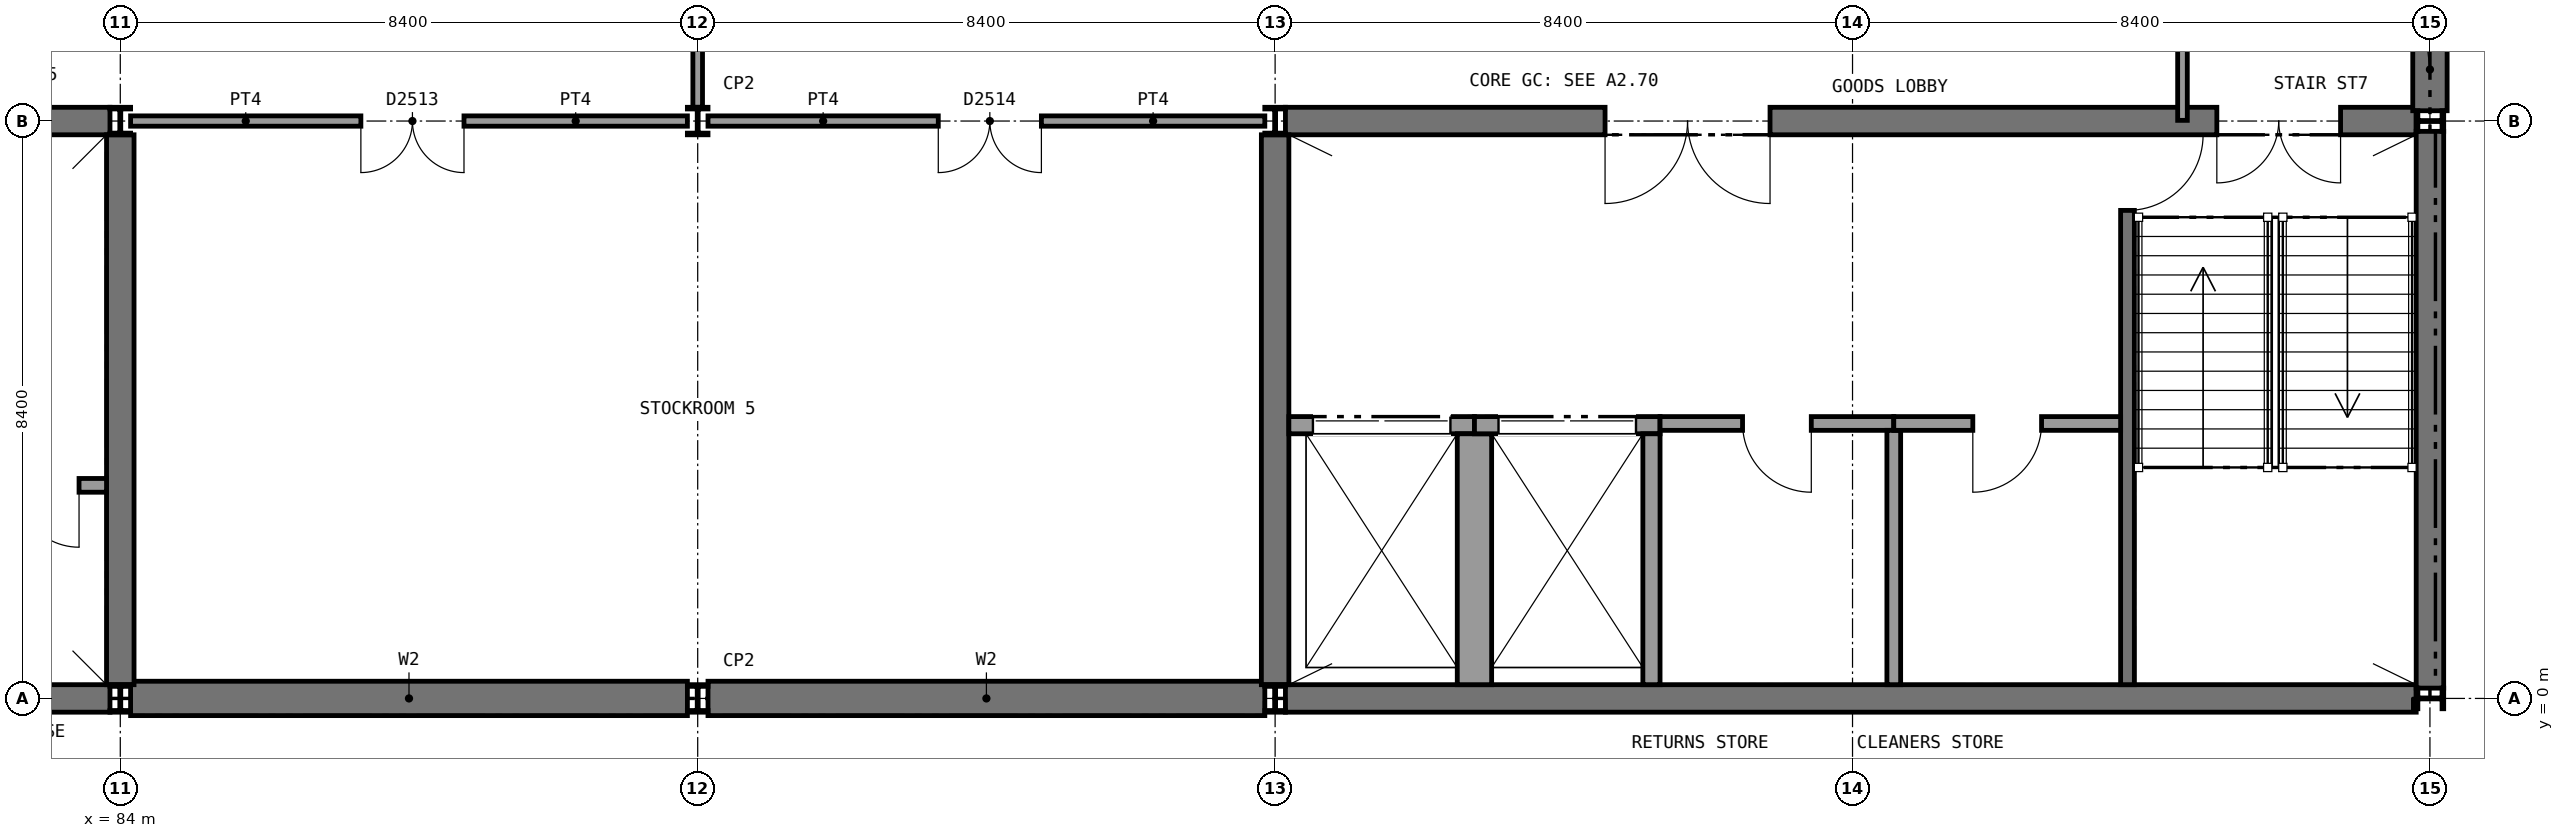
"""IFC4 building model, lengths in metres.
Left out: names, types, materials, properties, quantities, classifications, styles, units other than length and angle.
Written with IfcOpenShell. Run it as: python <this file> out.ifc"""

import sys

from ifc_helpers import new_model, si_unit, direction, frame, frame_2d, origin, origin_2d, place, context, subcontext, project, spatial, rectangle, i_section, extrude, element, fill, save


model = new_model("IFC4")
c1 = context("Model", 3, precision=1e-05, world=origin(), true_north=direction((0.0, 1.0)))
c2 = subcontext(c1, "Body", "Model", "MODEL_VIEW")
j1 = project(units=[si_unit("LENGTHUNIT", "METRE"), si_unit("PLANEANGLEUNIT", "RADIAN")], contexts=[c1])
p1 = place(None, origin())
s1 = spatial("IfcSite", under=j1, at=p1, CompositionType="ELEMENT")
p2 = place(p1, origin())
s2 = spatial("IfcBuilding", under=s1, at=p2, CompositionType="ELEMENT")
p3 = place(p2, frame((0.0, 0.0, 16.2)))
s3 = spatial("IfcBuildingStorey", under=s2, at=p3, CompositionType="ELEMENT", Elevation=16.2)
p4 = place(p3, frame((84.15, 0.0, 0.0), z_axis=(0.0, 0.0, 1.0), x_axis=(1.0, 0.0, 0.0)))
e1 = element("IfcWall", 1, at=p4, inside=s3, PredefinedType="SHEAR", context=c2, shape_type="SweptSolid", body=[
    extrude(rectangle(XDim=8.1, YDim=0.5, at=frame_2d((4.05, 0.0))), origin(), (0.0, 0.0, 1.0), 4.65),
])
p5 = place(p3, frame((92.55, 0.0, 0.0), z_axis=(0.0, 0.0, 1.0), x_axis=(1.0, 0.0, 0.0)))
e2 = element("IfcWall", 2, at=p5, inside=s3, PredefinedType="SHEAR", context=c2, shape_type="SweptSolid", body=[
    extrude(rectangle(XDim=8.1, YDim=0.5, at=frame_2d((4.05, 0.0))), origin(), (0.0, 0.0, 1.0), 4.65),
])
p6 = place(p3, frame((75.75, 0.0, 0.0), z_axis=(0.0, 0.0, 1.0), x_axis=(1.0, 0.0, 0.0)))
e3 = element("IfcWall", 3, at=p6, inside=s3, PredefinedType="SHEAR", context=c2, shape_type="SweptSolid", body=[
    extrude(rectangle(XDim=8.1, YDim=0.4, at=frame_2d((4.05, 0.0))), origin(), (0.0, 0.0, 1.0), 4.65),
])
p7 = place(p3, frame((75.75, 8.4, 0.0), z_axis=(0.0, 0.0, 1.0), x_axis=(1.0, 0.0, 0.0)))
e4 = element("IfcWall", 4, at=p7, inside=s3, PredefinedType="SHEAR", context=c2, shape_type="SweptSolid", body=[
    extrude(rectangle(XDim=8.1, YDim=0.4, at=frame_2d((4.05, 0.0))), origin(), (0.0, 0.0, 1.0), 4.65),
])
p8 = place(p7, frame((1.15, 0.0, 0.0)))
e5 = element("IfcOpeningElement", 5, at=p8, cuts=e4, PredefinedType="OPENING", context=c2, shape_type="SweptSolid", body=[
    extrude(rectangle(XDim=1.8, YDim=2.1, at=frame_2d((0.9, 1.05))), frame((0.0, 0.21, 0.0), z_axis=(0.0, -1.0, 0.0), x_axis=(1.0, 0.0, 0.0)), (0.0, 0.0, 1.0), 0.42),
])
p9 = place(p7, frame((5.3, 0.0, 0.0)))
e6 = element("IfcOpeningElement", 6, at=p9, cuts=e4, PredefinedType="OPENING", context=c2, shape_type="SweptSolid", body=[
    extrude(rectangle(XDim=1.8, YDim=2.1, at=frame_2d((0.9, 1.05))), frame((0.0, 0.21, 0.0), z_axis=(0.0, -1.0, 0.0), x_axis=(1.0, 0.0, 0.0)), (0.0, 0.0, 1.0), 0.42),
])
p10 = place(p3, frame((84.0, 0.2, 0.0), z_axis=(0.0, 0.0, 1.0), x_axis=(0.0, 1.0, 0.0)))
e7 = element("IfcWall", 7, at=p10, inside=s3, PredefinedType="SHEAR", context=c2, shape_type="SweptSolid", body=[
    extrude(rectangle(XDim=8.0, YDim=0.4, at=frame_2d((4.0, 0.0))), origin(), (0.0, 0.0, 1.0), 4.65),
])
p11 = place(p3, frame((100.95, 0.0, 0.0), z_axis=(0.0, 0.0, 1.0), x_axis=(1.0, 0.0, 0.0)))
e8 = element("IfcWall", 8, at=p11, inside=s3, PredefinedType="SHEAR", context=c2, shape_type="SweptSolid", body=[
    extrude(rectangle(XDim=16.45, YDim=0.4, at=frame_2d((8.225, 0.0))), origin(), (0.0, 0.0, 1.0), 4.65),
])
p12 = place(p3, frame((100.95, 8.4, 0.0), z_axis=(0.0, 0.0, 1.0), x_axis=(1.0, 0.0, 0.0)))
e9 = element("IfcWall", 9, at=p12, inside=s3, PredefinedType="SHEAR", context=c2, shape_type="SweptSolid", body=[
    extrude(rectangle(XDim=16.45, YDim=0.4, at=frame_2d((8.225, 0.0))), origin(), (0.0, 0.0, 1.0), 4.65),
])
p13 = place(p12, frame((13.55, 0.0, 0.0)))
e10 = element("IfcOpeningElement", 10, at=p13, cuts=e9, PredefinedType="OPENING", context=c2, shape_type="SweptSolid", body=[
    extrude(rectangle(XDim=1.8, YDim=2.1, at=frame_2d((0.9, 1.05))), frame((0.0, 0.21, 0.0), z_axis=(0.0, -1.0, 0.0), x_axis=(1.0, 0.0, 0.0)), (0.0, 0.0, 1.0), 0.42),
])
p14 = place(p12, frame((4.65, 0.0, 0.0)))
e11 = element("IfcOpeningElement", 11, at=p14, cuts=e9, PredefinedType="OPENING", context=c2, shape_type="SweptSolid", body=[
    extrude(rectangle(XDim=2.4, YDim=2.4, at=frame_2d((1.2, 1.2))), frame((0.0, 0.21, 0.0), z_axis=(0.0, -1.0, 0.0), x_axis=(1.0, 0.0, 0.0)), (0.0, 0.0, 1.0), 0.42),
])
p15 = place(p3, frame((100.8, 0.2, 0.0), z_axis=(0.0, 0.0, 1.0), x_axis=(0.0, 1.0, 0.0)))
e12 = element("IfcWall", 12, at=p15, inside=s3, PredefinedType="SHEAR", context=c2, shape_type="SweptSolid", body=[
    extrude(rectangle(XDim=8.0, YDim=0.4, at=frame_2d((4.0, 0.0))), origin(), (0.0, 0.0, 1.0), 4.65),
])
p16 = place(p3, frame((117.6, 0.15, 0.0), z_axis=(0.0, 0.0, 1.0), x_axis=(0.0, 1.0, 0.0)))
e13 = element("IfcWall", 13, at=p16, inside=s3, PredefinedType="SHEAR", context=c2, shape_type="SweptSolid", body=[
    extrude(rectangle(XDim=8.1, YDim=0.4, at=frame_2d((4.05, 0.0))), origin(), (0.0, 0.0, 1.0), 4.65),
])
for number, where, z_axis, x_axis in (
    (14, (84.0, 0.0, 0.0), (0.0, 0.0, 1.0), (1.0, 0.0, 0.0)),
    (15, (84.0, 8.4, 0.0), (0.0, 0.0, 1.0), (1.0, 0.0, 0.0)),
    (16, (92.4, 0.0, 0.0), (0.0, 0.0, 1.0), (1.0, 0.0, 0.0)),
    (17, (92.4, 8.4, 0.0), (0.0, 0.0, 1.0), (1.0, 0.0, 0.0)),
    (18, (100.8, 0.0, 0.0), (0.0, 0.0, 1.0), (1.0, 0.0, 0.0)),
    (19, (100.8, 8.4, 0.0), (0.0, 0.0, 1.0), (1.0, 0.0, 0.0)),
    (20, (117.6, 0.0, 0.0), (0.0, 0.0, 1.0), (0.0, 1.0, 0.0)),
    (21, (117.6, 8.4, 0.0), (0.0, 0.0, 1.0), (0.0, 1.0, 0.0)),
):
    element("IfcColumn", number, at=place(p3, frame(where, z_axis=z_axis, x_axis=x_axis)), inside=s3, PredefinedType="COLUMN", context=c2, shape_type="SweptSolid", body=[
        extrude(i_section(OverallWidth=0.3, OverallDepth=0.4, WebThickness=0.013, FlangeThickness=0.024, FilletRadius=0.027, at=origin_2d()), origin(), (0.0, 0.0, 1.0), 4.8),
    ])
p17 = place(p3, frame((84.15, 8.4, 0.0), z_axis=(0.0, 0.0, 1.0), x_axis=(1.0, 0.0, 0.0)))
e22 = element("IfcWall", 22, at=p17, inside=s3, PredefinedType="SOLIDWALL", context=c2, shape_type="SweptSolid", body=[
    extrude(rectangle(XDim=8.1, YDim=0.15, at=frame_2d((4.05, 0.0))), origin(), (0.0, 0.0, 1.0), 4.32),
])
p18 = place(p17, frame((3.35, 0.0, 0.0)))
e23 = element("IfcOpeningElement", 23, at=p18, cuts=e22, PredefinedType="OPENING", context=c2, shape_type="SweptSolid", body=[
    extrude(rectangle(XDim=1.5, YDim=2.1, at=frame_2d((0.75, 1.05))), frame((0.0, 0.085, 0.0), z_axis=(0.0, -1.0, 0.0), x_axis=(1.0, 0.0, 0.0)), (0.0, 0.0, 1.0), 0.17),
])
p19 = place(p3, frame((92.55, 8.4, 0.0), z_axis=(0.0, 0.0, 1.0), x_axis=(1.0, 0.0, 0.0)))
e24 = element("IfcWall", 24, at=p19, inside=s3, PredefinedType="SOLIDWALL", context=c2, shape_type="SweptSolid", body=[
    extrude(rectangle(XDim=8.1, YDim=0.15, at=frame_2d((4.05, 0.0))), origin(), (0.0, 0.0, 1.0), 4.32),
])
p20 = place(p19, frame((3.35, 0.0, 0.0)))
e25 = element("IfcOpeningElement", 25, at=p20, cuts=e24, PredefinedType="OPENING", context=c2, shape_type="SweptSolid", body=[
    extrude(rectangle(XDim=1.5, YDim=2.1, at=frame_2d((0.75, 1.05))), frame((0.0, 0.085, 0.0), z_axis=(0.0, -1.0, 0.0), x_axis=(1.0, 0.0, 0.0)), (0.0, 0.0, 1.0), 0.17),
])
p21 = place(p3, frame((92.4, 8.6, 0.0), z_axis=(0.0, 0.0, 1.0), x_axis=(0.0, 1.0, 0.0)))
e26 = element("IfcWall", 26, at=p21, inside=s3, PredefinedType="PARTITIONING", context=c2, shape_type="SweptSolid", body=[
    extrude(rectangle(XDim=3.1, YDim=0.14, at=frame_2d((1.55, 0.0))), origin(), (0.0, 0.0, 1.0), 4.21),
])
p22 = place(p3, frame((114.0, 8.41, 0.0), z_axis=(0.0, 0.0, 1.0), x_axis=(0.0, 1.0, 0.0)))
e27 = element("IfcWall", 27, at=p22, inside=s3, PredefinedType="PARTITIONING", context=c2, shape_type="SweptSolid", body=[
    extrude(rectangle(XDim=7.1, YDim=0.14, at=frame_2d((3.55, 0.0))), origin(), (0.0, 0.0, 1.0), 4.65),
])
p23 = place(p3, frame((117.6, 8.55, 0.0), z_axis=(0.0, 0.0, 1.0), x_axis=(0.0, 1.0, 0.0)))
e28 = element("IfcWall", 28, at=p23, inside=s3, PredefinedType="STANDARD", context=c2, shape_type="SweptSolid", body=[
    extrude(rectangle(XDim=8.1, YDim=0.5, at=frame_2d((4.05, 0.0))), origin(), (0.0, 0.0, 1.0), 4.65),
])
p24 = place(p23, frame((1.2, 0.0, 1.0)))
e29 = element("IfcOpeningElement", 29, at=p24, cuts=e28, PredefinedType="OPENING", context=c2, shape_type="SweptSolid", body=[
    extrude(rectangle(XDim=1.5, YDim=2.7, at=frame_2d((0.75, 1.35))), frame((0.0, 0.26, 0.0), z_axis=(0.0, -1.0, 0.0), x_axis=(1.0, 0.0, 0.0)), (0.0, 0.0, 1.0), 0.52),
])
p25 = place(p23, frame((5.4, 0.0, 1.0)))
e30 = element("IfcOpeningElement", 30, at=p25, cuts=e28, PredefinedType="OPENING", context=c2, shape_type="SweptSolid", body=[
    extrude(rectangle(XDim=1.5, YDim=2.7, at=frame_2d((0.75, 1.35))), frame((0.0, 0.26, 0.0), z_axis=(0.0, -1.0, 0.0), x_axis=(1.0, 0.0, 0.0)), (0.0, 0.0, 1.0), 0.52),
])
p26 = place(p3, frame((82.05, 3.1, 0.0), z_axis=(0.0, 0.0, 1.0), x_axis=(1.0, 0.0, 0.0)))
e31 = element("IfcWall", 31, at=p26, inside=s3, PredefinedType="PARTITIONING", context=c2, shape_type="SweptSolid", body=[
    extrude(rectangle(XDim=1.75, YDim=0.2, at=frame_2d((0.875, 0.0))), origin(), (0.0, 0.0, 1.0), 4.65),
])
p27 = place(p26, frame((0.45, 0.0, 0.0)))
e32 = element("IfcOpeningElement", 32, at=p27, cuts=e31, PredefinedType="OPENING", context=c2, shape_type="SweptSolid", body=[
    extrude(rectangle(XDim=0.9, YDim=2.1, at=frame_2d((0.45, 1.05))), frame((0.0, 0.11, 0.0), z_axis=(0.0, -1.0, 0.0), x_axis=(1.0, 0.0, 0.0)), (0.0, 0.0, 1.0), 0.22),
])
p28 = place(p3, frame((113.2, 0.2, 0.0), z_axis=(0.0, 0.0, 1.0), x_axis=(0.0, 1.0, 0.0)))
e33 = element("IfcWall", 33, at=p28, inside=s3, PredefinedType="SHEAR", context=c2, shape_type="SweptSolid", body=[
    extrude(rectangle(XDim=8.0, YDim=0.2, at=frame_2d((4.0, 0.0))), origin(), (0.0, 0.0, 1.0), 4.65),
])
p29 = place(p28, frame((6.9, 0.0, 0.0)))
e34 = element("IfcOpeningElement", 34, at=p29, cuts=e33, PredefinedType="OPENING", context=c2, shape_type="SweptSolid", body=[
    extrude(rectangle(XDim=1.11, YDim=2.1, at=frame_2d((0.555, 1.05))), frame((0.0, 0.11, 0.0), z_axis=(0.0, -1.0, 0.0), x_axis=(1.0, 0.0, 0.0)), (0.0, 0.0, 1.0), 0.22),
])
p30 = place(p3, frame((101.0, 3.975, 0.0), z_axis=(0.0, 0.0, 1.0), x_axis=(1.0, 0.0, 0.0)))
e35 = element("IfcWall", 35, at=p30, inside=s3, PredefinedType="SOLIDWALL", context=c2, shape_type="SweptSolid", body=[
    extrude(rectangle(XDim=2.7, YDim=0.25, at=frame_2d((1.35, 0.0))), origin(), (0.0, 0.0, 1.0), 4.8),
])
p31 = place(p30, frame((0.35, 0.0, 0.0)))
e36 = element("IfcOpeningElement", 36, at=p31, cuts=e35, PredefinedType="OPENING", context=c2, shape_type="SweptSolid", body=[
    extrude(rectangle(XDim=2.0, YDim=2.2, at=frame_2d((1.0, 1.1))), frame((0.0, 0.135, 0.0), z_axis=(0.0, -1.0, 0.0), x_axis=(1.0, 0.0, 0.0)), (0.0, 0.0, 1.0), 0.27),
])
p32 = place(p3, frame((103.7, 0.2, 0.0), z_axis=(0.0, 0.0, 1.0), x_axis=(0.0, 1.0, 0.0)))
e37 = element("IfcWall", 37, at=p32, inside=s3, PredefinedType="SOLIDWALL", context=c2, shape_type="SweptSolid", body=[
    extrude(rectangle(XDim=3.65, YDim=0.5, at=frame_2d((1.825, 0.0))), origin(), (0.0, 0.0, 1.0), 4.8),
])
p33 = place(p3, frame((103.7, 3.975, 0.0), z_axis=(0.0, 0.0, 1.0), x_axis=(1.0, 0.0, 0.0)))
e38 = element("IfcWall", 38, at=p33, inside=s3, PredefinedType="SOLIDWALL", context=c2, shape_type="SweptSolid", body=[
    extrude(rectangle(XDim=2.7, YDim=0.25, at=frame_2d((1.35, 0.0))), origin(), (0.0, 0.0, 1.0), 4.8),
])
p34 = place(p33, frame((0.35, 0.0, 0.0)))
e39 = element("IfcOpeningElement", 39, at=p34, cuts=e38, PredefinedType="OPENING", context=c2, shape_type="SweptSolid", body=[
    extrude(rectangle(XDim=2.0, YDim=2.2, at=frame_2d((1.0, 1.1))), frame((0.0, 0.135, 0.0), z_axis=(0.0, -1.0, 0.0), x_axis=(1.0, 0.0, 0.0)), (0.0, 0.0, 1.0), 0.27),
])
p35 = place(p3, frame((106.275, 0.2, 0.0), z_axis=(0.0, 0.0, 1.0), x_axis=(0.0, 1.0, 0.0)))
e40 = element("IfcWall", 40, at=p35, inside=s3, PredefinedType="SOLIDWALL", context=c2, shape_type="SweptSolid", body=[
    extrude(rectangle(XDim=3.65, YDim=0.25, at=frame_2d((1.825, 0.0))), origin(), (0.0, 0.0, 1.0), 4.8),
])
p36 = place(p3, frame((106.4, 4.0, 0.0), z_axis=(0.0, 0.0, 1.0), x_axis=(1.0, 0.0, 0.0)))
e41 = element("IfcWall", 41, at=p36, inside=s3, PredefinedType="PARTITIONING", context=c2, shape_type="SweptSolid", body=[
    extrude(rectangle(XDim=3.4, YDim=0.2, at=frame_2d((1.7, 0.0))), origin(), (0.0, 0.0, 1.0), 4.65),
])
p37 = place(p36, frame((1.2, 0.0, 0.0)))
e42 = element("IfcOpeningElement", 42, at=p37, cuts=e41, PredefinedType="OPENING", context=c2, shape_type="SweptSolid", body=[
    extrude(rectangle(XDim=1.0, YDim=2.1, at=frame_2d((0.5, 1.05))), frame((0.0, 0.11, 0.0), z_axis=(0.0, -1.0, 0.0), x_axis=(1.0, 0.0, 0.0)), (0.0, 0.0, 1.0), 0.22),
])
p38 = place(p3, frame((109.8, 0.2, 0.0), z_axis=(0.0, 0.0, 1.0), x_axis=(0.0, 1.0, 0.0)))
e43 = element("IfcWall", 43, at=p38, inside=s3, PredefinedType="PARTITIONING", context=c2, shape_type="SweptSolid", body=[
    extrude(rectangle(XDim=3.7, YDim=0.2, at=frame_2d((1.85, 0.0))), origin(), (0.0, 0.0, 1.0), 4.65),
])
p39 = place(p3, frame((109.8, 4.0, 0.0), z_axis=(0.0, 0.0, 1.0), x_axis=(1.0, 0.0, 0.0)))
e44 = element("IfcWall", 44, at=p39, inside=s3, PredefinedType="PARTITIONING", context=c2, shape_type="SweptSolid", body=[
    extrude(rectangle(XDim=3.3, YDim=0.2, at=frame_2d((1.65, 0.0))), origin(), (0.0, 0.0, 1.0), 4.65),
])
p40 = place(p39, frame((1.15, 0.0, 0.0)))
e45 = element("IfcOpeningElement", 45, at=p40, cuts=e44, PredefinedType="OPENING", context=c2, shape_type="SweptSolid", body=[
    extrude(rectangle(XDim=1.0, YDim=2.1, at=frame_2d((0.5, 1.05))), frame((0.0, 0.11, 0.0), z_axis=(0.0, -1.0, 0.0), x_axis=(1.0, 0.0, 0.0)), (0.0, 0.0, 1.0), 0.22),
])
p41 = place(p18, frame((1.5, 0.0, 0.0), z_axis=(0.0, 0.0, 1.0), x_axis=(-1.0, 0.0, 0.0)))
e46 = element("IfcDoor", 46, at=p41, inside=s3, OperationType="DOUBLE_DOOR_SINGLE_SWING", PredefinedType="DOOR", context=c2, shape_type="SweptSolid", body=[
    extrude(rectangle(XDim=1.5, YDim=2.1, at=frame_2d((0.75, 1.05))), frame((0.0, 0.025, 0.0), z_axis=(0.0, -1.0, 0.0), x_axis=(1.0, 0.0, 0.0)), (0.0, 0.0, 1.0), 0.05),
])
fill(e23, e46)
p42 = place(p20, frame((1.5, 0.0, 0.0), z_axis=(0.0, 0.0, 1.0), x_axis=(-1.0, 0.0, 0.0)))
e47 = element("IfcDoor", 47, at=p42, inside=s3, OperationType="DOUBLE_DOOR_SINGLE_SWING", PredefinedType="DOOR", context=c2, shape_type="SweptSolid", body=[
    extrude(rectangle(XDim=1.5, YDim=2.1, at=frame_2d((0.75, 1.05))), frame((0.0, 0.025, 0.0), z_axis=(0.0, -1.0, 0.0), x_axis=(1.0, 0.0, 0.0)), (0.0, 0.0, 1.0), 0.05),
])
fill(e25, e47)
p43 = place(p27, frame((0.9, 0.0, 0.0), z_axis=(0.0, 0.0, 1.0), x_axis=(-1.0, 0.0, 0.0)))
e48 = element("IfcDoor", 48, at=p43, inside=s3, OperationType="SINGLE_SWING_LEFT", PredefinedType="DOOR", context=c2, shape_type="SweptSolid", body=[
    extrude(rectangle(XDim=0.9, YDim=2.1, at=frame_2d((0.45, 1.05))), frame((0.0, 0.025, 0.0), z_axis=(0.0, -1.0, 0.0), x_axis=(1.0, 0.0, 0.0)), (0.0, 0.0, 1.0), 0.05),
])
fill(e32, e48)
p44 = place(p29, frame((1.1, 0.0, 0.0), z_axis=(0.0, 0.0, 1.0), x_axis=(-1.0, 0.0, 0.0)))
e49 = element("IfcDoor", 49, at=p44, inside=s3, OperationType="SINGLE_SWING_LEFT", PredefinedType="DOOR", context=c2, shape_type="SweptSolid", body=[
    extrude(rectangle(XDim=1.1, YDim=2.1, at=frame_2d((0.55, 1.05))), frame((0.0, 0.025, 0.0), z_axis=(0.0, -1.0, 0.0), x_axis=(1.0, 0.0, 0.0)), (0.0, 0.0, 1.0), 0.05),
])
fill(e34, e49)
p45 = place(p31, origin())
e50 = element("IfcDoor", 50, at=p45, inside=s3, OperationType="DOUBLE_DOOR_SLIDING", PredefinedType="DOOR", context=c2, shape_type="SweptSolid", body=[
    extrude(rectangle(XDim=2.0, YDim=2.2, at=frame_2d((1.0, 1.1))), frame((0.0, 0.025, 0.0), z_axis=(0.0, -1.0, 0.0), x_axis=(1.0, 0.0, 0.0)), (0.0, 0.0, 1.0), 0.05),
])
fill(e36, e50)
p46 = place(p34, origin())
e51 = element("IfcDoor", 51, at=p46, inside=s3, OperationType="DOUBLE_DOOR_SLIDING", PredefinedType="DOOR", context=c2, shape_type="SweptSolid", body=[
    extrude(rectangle(XDim=2.0, YDim=2.2, at=frame_2d((1.0, 1.1))), frame((0.0, 0.025, 0.0), z_axis=(0.0, -1.0, 0.0), x_axis=(1.0, 0.0, 0.0)), (0.0, 0.0, 1.0), 0.05),
])
fill(e39, e51)
p47 = place(p37, frame((1.0, 0.0, 0.0), z_axis=(0.0, 0.0, 1.0), x_axis=(-1.0, 0.0, 0.0)))
e52 = element("IfcDoor", 52, at=p47, inside=s3, OperationType="SINGLE_SWING_LEFT", PredefinedType="DOOR", context=c2, shape_type="SweptSolid", body=[
    extrude(rectangle(XDim=1.0, YDim=2.1, at=frame_2d((0.5, 1.05))), frame((0.0, 0.025, 0.0), z_axis=(0.0, -1.0, 0.0), x_axis=(1.0, 0.0, 0.0)), (0.0, 0.0, 1.0), 0.05),
])
fill(e42, e52)
p48 = place(p40, frame((1.0, 0.0, 0.0), z_axis=(0.0, 0.0, 1.0), x_axis=(-1.0, 0.0, 0.0)))
e53 = element("IfcDoor", 53, at=p48, inside=s3, OperationType="SINGLE_SWING_RIGHT", PredefinedType="DOOR", context=c2, shape_type="SweptSolid", body=[
    extrude(rectangle(XDim=1.0, YDim=2.1, at=frame_2d((0.5, 1.05))), frame((0.0, 0.025, 0.0), z_axis=(0.0, -1.0, 0.0), x_axis=(1.0, 0.0, 0.0)), (0.0, 0.0, 1.0), 0.05),
])
fill(e45, e53)
p49 = place(p13, frame((1.8, 0.0, 0.0), z_axis=(0.0, 0.0, 1.0), x_axis=(-1.0, 0.0, 0.0)))
e54 = element("IfcDoor", 54, at=p49, inside=s3, OperationType="DOUBLE_DOOR_SINGLE_SWING", PredefinedType="DOOR", context=c2, shape_type="SweptSolid", body=[
    extrude(rectangle(XDim=1.8, YDim=2.1, at=frame_2d((0.9, 1.05))), frame((0.0, 0.025, 0.0), z_axis=(0.0, -1.0, 0.0), x_axis=(1.0, 0.0, 0.0)), (0.0, 0.0, 1.0), 0.05),
])
fill(e10, e54)
p50 = place(p14, frame((2.4, 0.0, 0.0), z_axis=(0.0, 0.0, 1.0), x_axis=(-1.0, 0.0, 0.0)))
e55 = element("IfcDoor", 55, at=p50, inside=s3, OperationType="DOUBLE_DOOR_SINGLE_SWING", PredefinedType="DOOR", context=c2, shape_type="SweptSolid", body=[
    extrude(rectangle(XDim=2.4, YDim=2.4, at=frame_2d((1.2, 1.2))), frame((0.0, 0.025, 0.0), z_axis=(0.0, -1.0, 0.0), x_axis=(1.0, 0.0, 0.0)), (0.0, 0.0, 1.0), 0.05),
])
fill(e11, e55)
save(model, sys.argv[1])
